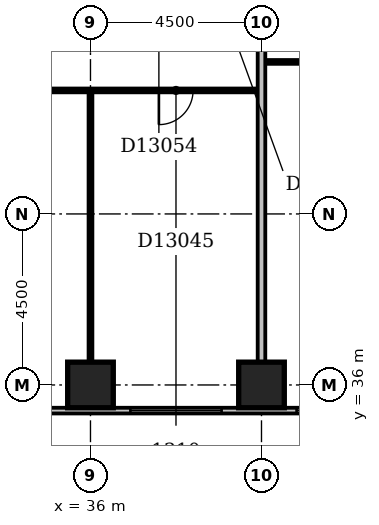
"""IFC4 building model, lengths in metres.
Left out: names, types, materials, properties, quantities, classifications, styles, units other than length and angle.
Written with IfcOpenShell. Run it as: python <this file> out.ifc"""

import sys

from ifc_helpers import new_model, si_unit, direction, frame, frame_2d, origin, origin_2d, place, context, subcontext, project, spatial, rectangle, extrude, element, fill, save


model = new_model("IFC4")
c1 = context("Model", 3, precision=1e-05, world=origin(), true_north=direction((0.0, 1.0)))
c2 = subcontext(c1, "Body", "Model", "MODEL_VIEW")
j1 = project(units=[si_unit("LENGTHUNIT", "METRE"), si_unit("PLANEANGLEUNIT", "RADIAN")], contexts=[c1])
p1 = place(None, origin())
s1 = spatial("IfcSite", under=j1, at=p1, CompositionType="ELEMENT")
p2 = place(p1, origin())
s2 = spatial("IfcBuilding", under=s1, at=p2, CompositionType="ELEMENT")
p3 = place(p2, frame((0.0, 0.0, 57.8)))
s3 = spatial("IfcBuildingStorey", under=s2, at=p3, CompositionType="ELEMENT", Elevation=57.8)
for number, where, z_axis, x_axis in (
    (1, (36.0, 36.0, -0.3), (0.0, 0.0, 1.0), (1.0, 0.0, 0.0)),
    (2, (40.5, 36.0, -0.3), (0.0, 0.0, 1.0), (1.0, 0.0, 0.0)),
):
    element("IfcColumn", number, at=place(p3, frame(where, z_axis=z_axis, x_axis=x_axis)), inside=s3, PredefinedType="COLUMN", context=c2, shape_type="SweptSolid", body=[
        extrude(rectangle(XDim=1.2, YDim=1.2, at=origin_2d()), origin(), (0.0, 0.0, 1.0), 3.6),
    ])
p4 = place(p3, frame((23.1, 35.325, 0.0), z_axis=(0.0, 0.0, 1.0), x_axis=(1.0, 0.0, 0.0)))
e3 = element("IfcWall", 3, at=p4, inside=s3, PredefinedType="STANDARD", context=c2, shape_type="SweptSolid", body=[
    extrude(rectangle(XDim=45.15, YDim=0.15, at=frame_2d((22.575, 0.0))), origin(), (0.0, 0.0, 1.0), 2.7),
])
p5 = place(p4, frame((0.45, 0.0, 0.6)))
e4 = element("IfcOpeningElement", 4, at=p5, cuts=e3, PredefinedType="OPENING", context=c2, shape_type="SweptSolid", body=[
    extrude(rectangle(XDim=2.4, YDim=1.8, at=frame_2d((1.2, 0.9))), frame((0.0, 0.087, 0.0), z_axis=(0.0, -1.0, 0.0), x_axis=(1.0, 0.0, 0.0)), (0.0, 0.0, 1.0), 0.174),
])
p6 = place(p4, frame((6.854, 0.0, 0.6)))
e5 = element("IfcOpeningElement", 5, at=p6, cuts=e3, PredefinedType="OPENING", context=c2, shape_type="SweptSolid", body=[
    extrude(rectangle(XDim=0.6, YDim=1.8, at=frame_2d((0.3, 0.9))), frame((0.0, 0.087, 0.0), z_axis=(0.0, -1.0, 0.0), x_axis=(1.0, 0.0, 0.0)), (0.0, 0.0, 1.0), 0.174),
])
p7 = place(p4, frame((9.45, 0.0, 0.6)))
e6 = element("IfcOpeningElement", 6, at=p7, cuts=e3, PredefinedType="OPENING", context=c2, shape_type="SweptSolid", body=[
    extrude(rectangle(XDim=2.4, YDim=1.8, at=frame_2d((1.2, 0.9))), frame((0.0, 0.087, 0.0), z_axis=(0.0, -1.0, 0.0), x_axis=(1.0, 0.0, 0.0)), (0.0, 0.0, 1.0), 0.174),
])
p8 = place(p4, frame((13.95, 0.0, 0.6)))
e7 = element("IfcOpeningElement", 7, at=p8, cuts=e3, PredefinedType="OPENING", context=c2, shape_type="SweptSolid", body=[
    extrude(rectangle(XDim=2.4, YDim=1.8, at=frame_2d((1.2, 0.9))), frame((0.0, 0.087, 0.0), z_axis=(0.0, -1.0, 0.0), x_axis=(1.0, 0.0, 0.0)), (0.0, 0.0, 1.0), 0.174),
])
p9 = place(p4, frame((18.323, 0.0, 0.6)))
e8 = element("IfcOpeningElement", 8, at=p9, cuts=e3, PredefinedType="OPENING", context=c2, shape_type="SweptSolid", body=[
    extrude(rectangle(XDim=1.2, YDim=1.8, at=frame_2d((0.6, 0.9))), frame((0.0, 0.087, 0.0), z_axis=(0.0, -1.0, 0.0), x_axis=(1.0, 0.0, 0.0)), (0.0, 0.0, 1.0), 0.174),
])
p10 = place(p4, frame((22.95, 0.0, 0.6)))
e9 = element("IfcOpeningElement", 9, at=p10, cuts=e3, PredefinedType="OPENING", context=c2, shape_type="SweptSolid", body=[
    extrude(rectangle(XDim=2.4, YDim=1.8, at=frame_2d((1.2, 0.9))), frame((0.0, 0.087, 0.0), z_axis=(0.0, -1.0, 0.0), x_axis=(1.0, 0.0, 0.0)), (0.0, 0.0, 1.0), 0.174),
])
p11 = place(p4, frame((27.45, 0.0, 0.6)))
e10 = element("IfcOpeningElement", 10, at=p11, cuts=e3, PredefinedType="OPENING", context=c2, shape_type="SweptSolid", body=[
    extrude(rectangle(XDim=2.4, YDim=1.8, at=frame_2d((1.2, 0.9))), frame((0.0, 0.087, 0.0), z_axis=(0.0, -1.0, 0.0), x_axis=(1.0, 0.0, 0.0)), (0.0, 0.0, 1.0), 0.174),
])
p12 = place(p4, frame((31.706, 0.0, 0.6)))
e11 = element("IfcOpeningElement", 11, at=p12, cuts=e3, PredefinedType="OPENING", context=c2, shape_type="SweptSolid", body=[
    extrude(rectangle(XDim=1.2, YDim=1.8, at=frame_2d((0.6, 0.9))), frame((0.0, 0.087, 0.0), z_axis=(0.0, -1.0, 0.0), x_axis=(1.0, 0.0, 0.0)), (0.0, 0.0, 1.0), 0.174),
])
p13 = place(p4, frame((36.45, 0.0, 0.6)))
e12 = element("IfcOpeningElement", 12, at=p13, cuts=e3, PredefinedType="OPENING", context=c2, shape_type="SweptSolid", body=[
    extrude(rectangle(XDim=2.4, YDim=1.8, at=frame_2d((1.2, 0.9))), frame((0.0, 0.087, 0.0), z_axis=(0.0, -1.0, 0.0), x_axis=(1.0, 0.0, 0.0)), (0.0, 0.0, 1.0), 0.174),
])
p14 = place(p4, frame((40.95, 0.0, 0.6)))
e13 = element("IfcOpeningElement", 13, at=p14, cuts=e3, PredefinedType="OPENING", context=c2, shape_type="SweptSolid", body=[
    extrude(rectangle(XDim=2.4, YDim=1.8, at=frame_2d((1.2, 0.9))), frame((0.0, 0.087, 0.0), z_axis=(0.0, -1.0, 0.0), x_axis=(1.0, 0.0, 0.0)), (0.0, 0.0, 1.0), 0.174),
])
p15 = place(p3, frame((36.0, 36.6, 0.0), z_axis=(0.0, 0.0, 1.0), x_axis=(0.0, 1.0, 0.0)))
e14 = element("IfcWall", 14, at=p15, inside=s3, PredefinedType="PARTITIONING", context=c2, shape_type="SweptSolid", body=[
    extrude(rectangle(XDim=7.1, YDim=0.1, at=frame_2d((3.55, 0.0))), origin(), (0.0, 0.0, 1.0), 2.4),
])
p16 = place(p3, frame((40.5, 36.6, 0.0), z_axis=(0.0, 0.0, 1.0), x_axis=(0.0, 1.0, 0.0)))
e15 = element("IfcWall", 15, at=p16, inside=s3, PredefinedType="PARTITIONING", context=c2, shape_type="SweptSolid", body=[
    extrude(rectangle(XDim=12.8, YDim=0.2, at=frame_2d((6.4, 0.0))), origin(), (0.0, 0.0, 1.0), 3.3),
])
p17 = place(p3, frame((27.1, 43.75, 0.0), z_axis=(0.0, 0.0, 1.0), x_axis=(1.0, 0.0, 0.0)))
e16 = element("IfcWall", 16, at=p17, inside=s3, PredefinedType="PARTITIONING", context=c2, shape_type="SweptSolid", body=[
    extrude(rectangle(XDim=13.3, YDim=0.1, at=frame_2d((6.65, 0.0))), origin(), (0.0, 0.0, 1.0), 3.3),
])
p18 = place(p17, frame((3.9, 0.0, 0.0)))
e17 = element("IfcOpeningElement", 17, at=p18, cuts=e16, PredefinedType="OPENING", context=c2, shape_type="SweptSolid", body=[
    extrude(rectangle(XDim=0.9, YDim=2.1, at=frame_2d((0.45, 1.05))), frame((0.0, 0.062, 0.0), z_axis=(0.0, -1.0, 0.0), x_axis=(1.0, 0.0, 0.0)), (0.0, 0.0, 1.0), 0.124),
])
p19 = place(p17, frame((10.7, 0.0, 0.0)))
e18 = element("IfcOpeningElement", 18, at=p19, cuts=e16, PredefinedType="OPENING", context=c2, shape_type="SweptSolid", body=[
    extrude(rectangle(XDim=0.9, YDim=2.1, at=frame_2d((0.45, 1.05))), frame((0.0, 0.062, 0.0), z_axis=(0.0, -1.0, 0.0), x_axis=(1.0, 0.0, 0.0)), (0.0, 0.0, 1.0), 0.124),
])
p20 = place(p3, frame((40.6, 44.5, 0.0), z_axis=(0.0, 0.0, 1.0), x_axis=(1.0, 0.0, 0.0)))
e19 = element("IfcWall", 19, at=p20, inside=s3, PredefinedType="PARTITIONING", context=c2, shape_type="SweptSolid", body=[
    extrude(rectangle(XDim=13.3, YDim=0.1, at=frame_2d((6.65, 0.0))), origin(), (0.0, 0.0, 1.0), 3.3),
])
p21 = place(p20, frame((1.7, 0.0, 0.0)))
e20 = element("IfcOpeningElement", 20, at=p21, cuts=e19, PredefinedType="OPENING", context=c2, shape_type="SweptSolid", body=[
    extrude(rectangle(XDim=0.9, YDim=2.1, at=frame_2d((0.45, 1.05))), frame((0.0, 0.062, 0.0), z_axis=(0.0, -1.0, 0.0), x_axis=(1.0, 0.0, 0.0)), (0.0, 0.0, 1.0), 0.124),
])
p22 = place(p20, frame((6.2, 0.0, 0.0)))
e21 = element("IfcOpeningElement", 21, at=p22, cuts=e19, PredefinedType="OPENING", context=c2, shape_type="SweptSolid", body=[
    extrude(rectangle(XDim=0.9, YDim=2.1, at=frame_2d((0.45, 1.05))), frame((0.0, 0.062, 0.0), z_axis=(0.0, -1.0, 0.0), x_axis=(1.0, 0.0, 0.0)), (0.0, 0.0, 1.0), 0.124),
])
p23 = place(p20, frame((10.7, 0.0, 0.0)))
e22 = element("IfcOpeningElement", 22, at=p23, cuts=e19, PredefinedType="OPENING", context=c2, shape_type="SweptSolid", body=[
    extrude(rectangle(XDim=0.9, YDim=2.1, at=frame_2d((0.45, 1.05))), frame((0.0, 0.062, 0.0), z_axis=(0.0, -1.0, 0.0), x_axis=(1.0, 0.0, 0.0)), (0.0, 0.0, 1.0), 0.124),
])
p24 = place(p8, origin())
e23 = element("IfcWindow", 23, at=p24, inside=s3, PartitioningType="SINGLE_PANEL", PredefinedType="WINDOW", context=c2, shape_type="SweptSolid", body=[
    extrude(rectangle(XDim=2.4, YDim=1.8, at=frame_2d((1.2, 0.9))), frame((0.0, 0.03, 0.0), z_axis=(0.0, -1.0, 0.0), x_axis=(1.0, 0.0, 0.0)), (0.0, 0.0, 1.0), 0.06),
])
fill(e7, e23)
p25 = place(p9, origin())
e24 = element("IfcWindow", 24, at=p25, inside=s3, PartitioningType="SINGLE_PANEL", PredefinedType="WINDOW", context=c2, shape_type="SweptSolid", body=[
    extrude(rectangle(XDim=1.2, YDim=1.8, at=frame_2d((0.6, 0.9))), frame((0.0, 0.03, 0.0), z_axis=(0.0, -1.0, 0.0), x_axis=(1.0, 0.0, 0.0)), (0.0, 0.0, 1.0), 0.06),
])
fill(e8, e24)
p26 = place(p19, frame((0.9, 0.0, 0.0), z_axis=(0.0, 0.0, 1.0), x_axis=(-1.0, 0.0, 0.0)))
e25 = element("IfcDoor", 25, at=p26, inside=s3, OperationType="SINGLE_SWING_RIGHT", PredefinedType="DOOR", context=c2, shape_type="SweptSolid", body=[
    extrude(rectangle(XDim=0.9, YDim=2.1, at=frame_2d((0.45, 1.05))), frame((0.0, 0.025, 0.0), z_axis=(0.0, -1.0, 0.0), x_axis=(1.0, 0.0, 0.0)), (0.0, 0.0, 1.0), 0.05),
])
fill(e18, e25)
save(model, sys.argv[1])
